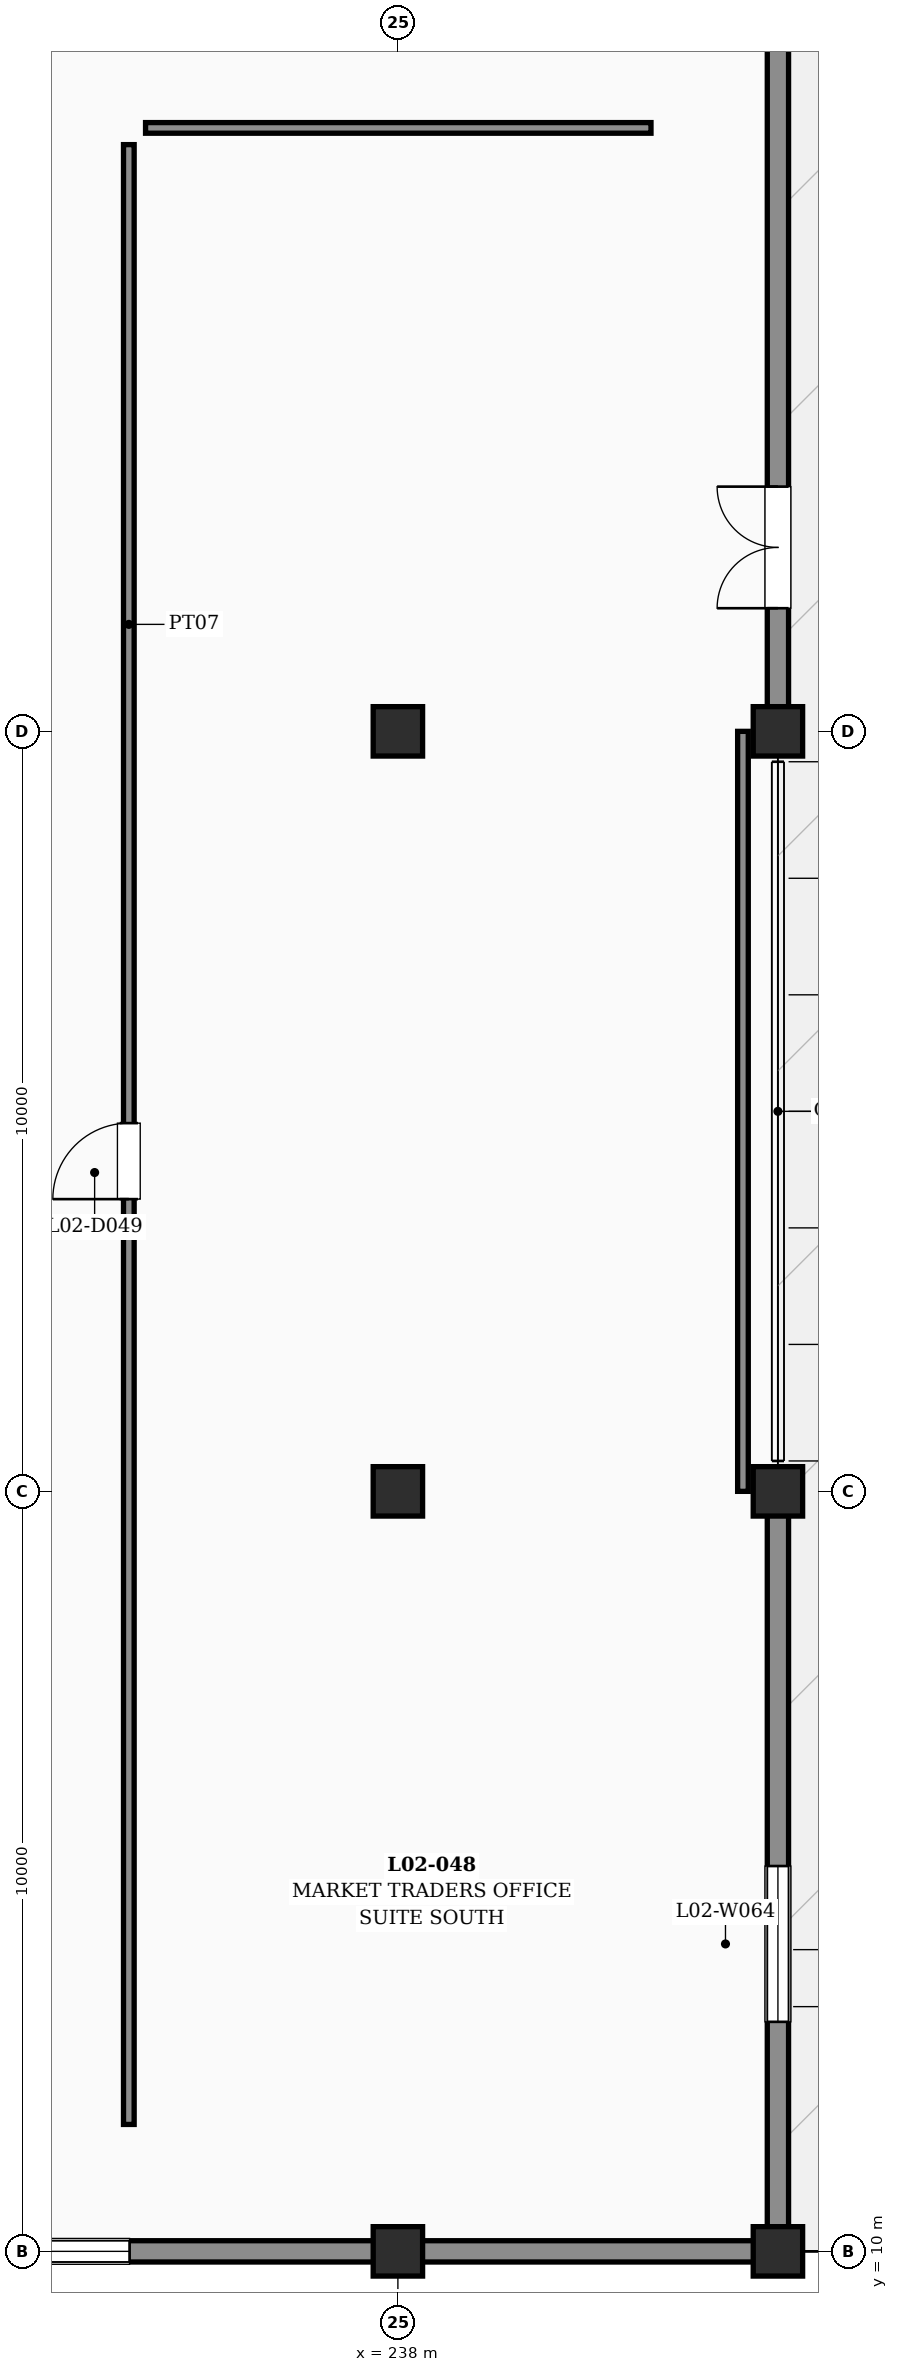
"""IFC4 building model, lengths in metres.
Left out: names, types, materials, properties, quantities, classifications, styles, units other than length and angle.
Written with IfcOpenShell. Run it as: python <this file> out.ifc"""

import sys

from ifc_helpers import new_model, si_unit, direction, frame, frame_2d, origin, origin_2d, place, context, subcontext, project, spatial, rectangle, extrude, element, fill, save


model = new_model("IFC4")
c1 = context("Model", 3, precision=1e-05, world=origin(), true_north=direction((0.0, 1.0)))
c2 = subcontext(c1, "Body", "Model", "MODEL_VIEW")
j1 = project(units=[si_unit("LENGTHUNIT", "METRE"), si_unit("PLANEANGLEUNIT", "RADIAN")], contexts=[c1])
p1 = place(None, origin())
s1 = spatial("IfcSite", under=j1, at=p1, CompositionType="ELEMENT")
p2 = place(p1, origin())
s2 = spatial("IfcBuilding", under=s1, at=p2, CompositionType="ELEMENT")
p3 = place(p2, frame((0.0, 0.0, 10.8)))
s3 = spatial("IfcBuildingStorey", under=s2, at=p3, CompositionType="ELEMENT", Elevation=10.8)
for number, where, z_axis, x_axis in (
    (1, (238.0, 10.0, 0.0), (0.0, 0.0, 1.0), (1.0, 0.0, 0.0)),
    (2, (238.0, 20.0, 0.0), (0.0, 0.0, 1.0), (1.0, 0.0, 0.0)),
    (3, (238.0, 30.0, 0.0), (0.0, 0.0, 1.0), (1.0, 0.0, 0.0)),
    (4, (243.0, 10.0, 0.0), (0.0, 0.0, 1.0), (1.0, 0.0, 0.0)),
    (5, (243.0, 20.0, 0.0), (0.0, 0.0, 1.0), (1.0, 0.0, 0.0)),
    (6, (243.0, 30.0, 0.0), (0.0, 0.0, 1.0), (1.0, 0.0, 0.0)),
):
    element("IfcColumn", number, at=place(p3, frame(where, z_axis=z_axis, x_axis=x_axis)), inside=s3, PredefinedType="COLUMN", context=c2, shape_type="SweptSolid", body=[
        extrude(rectangle(XDim=0.65, YDim=0.65, at=origin_2d()), origin(), (0.0, 0.0, 1.0), 4.2),
    ])
p4 = place(p3, frame((243.0, 10.22, 0.0), z_axis=(0.0, 0.0, 1.0), x_axis=(0.0, 1.0, 0.0)))
e7 = element("IfcWall", 7, at=p4, inside=s3, PredefinedType="SOLIDWALL", context=c2, shape_type="SweptSolid", body=[
    extrude(rectangle(XDim=9.56, YDim=0.28, at=frame_2d((4.78, 0.0))), origin(), (0.0, 0.0, 1.0), 3.16),
])
p5 = place(p4, frame((2.8, 0.0, 0.9)))
e8 = element("IfcOpeningElement", 8, at=p5, cuts=e7, PredefinedType="OPENING", context=c2, shape_type="SweptSolid", body=[
    extrude(rectangle(XDim=2.05, YDim=1.85, at=frame_2d((1.025, 0.925))), frame((0.0, 0.15, 0.0), z_axis=(0.0, -1.0, 0.0), x_axis=(1.0, 0.0, 0.0)), (0.0, 0.0, 1.0), 0.3),
])
p6 = place(p3, frame((243.0, 30.22, 0.0), z_axis=(0.0, 0.0, 1.0), x_axis=(0.0, 1.0, 0.0)))
e9 = element("IfcWall", 9, at=p6, inside=s3, PredefinedType="SOLIDWALL", context=c2, shape_type="SweptSolid", body=[
    extrude(rectangle(XDim=9.56, YDim=0.28, at=frame_2d((4.78, 0.0))), origin(), (0.0, 0.0, 1.0), 3.16),
])
p7 = place(p6, frame((1.4, 0.0, 0.0)))
e10 = element("IfcOpeningElement", 10, at=p7, cuts=e9, PredefinedType="OPENING", context=c2, shape_type="SweptSolid", body=[
    extrude(rectangle(XDim=1.6, YDim=2.3, at=frame_2d((0.8, 1.15))), frame((0.0, 0.15, 0.0), z_axis=(0.0, -1.0, 0.0), x_axis=(1.0, 0.0, 0.0)), (0.0, 0.0, 1.0), 0.3),
])
p8 = place(p3, frame((230.22, 10.0, 0.0), z_axis=(0.0, 0.0, 1.0), x_axis=(1.0, 0.0, 0.0)))
e11 = element("IfcWall", 11, at=p8, inside=s3, PredefinedType="SOLIDWALL", context=c2, shape_type="SweptSolid", body=[
    extrude(rectangle(XDim=7.56, YDim=0.28, at=frame_2d((3.78, 0.0))), origin(), (0.0, 0.0, 1.0), 3.11),
])
p9 = place(p8, frame((2.2, 0.0, 0.95)))
e12 = element("IfcOpeningElement", 12, at=p9, cuts=e11, PredefinedType="OPENING", context=c2, shape_type="SweptSolid", body=[
    extrude(rectangle(XDim=2.05, YDim=1.85, at=frame_2d((1.025, 0.925))), frame((0.0, 0.15, 0.0), z_axis=(0.0, -1.0, 0.0), x_axis=(1.0, 0.0, 0.0)), (0.0, 0.0, 1.0), 0.3),
])
p10 = place(p3, frame((238.22, 10.0, 0.0), z_axis=(0.0, 0.0, 1.0), x_axis=(1.0, 0.0, 0.0)))
e13 = element("IfcWall", 13, at=p10, inside=s3, PredefinedType="SOLIDWALL", context=c2, shape_type="SweptSolid", body=[
    extrude(rectangle(XDim=4.56, YDim=0.28, at=frame_2d((2.28, 0.0))), origin(), (0.0, 0.0, 1.0), 3.11),
])
p11 = place(p3, frame((234.46, 11.67, 0.0), z_axis=(0.0, 0.0, 1.0), x_axis=(0.0, 1.0, 0.0)))
e14 = element("IfcWall", 14, at=p11, inside=s3, PredefinedType="PARTITIONING", context=c2, shape_type="SweptSolid", body=[
    extrude(rectangle(XDim=26.05, YDim=0.14, at=frame_2d((13.025, 0.0))), origin(), (0.0, 0.0, 1.0), 3.86),
])
p12 = place(p11, frame((12.175, 0.0, 0.0)))
e15 = element("IfcOpeningElement", 15, at=p12, cuts=e14, PredefinedType="OPENING", context=c2, shape_type="SweptSolid", body=[
    extrude(rectangle(XDim=1.0, YDim=2.2, at=frame_2d((0.5, 1.1))), frame((0.0, 0.08, 0.0), z_axis=(0.0, -1.0, 0.0), x_axis=(1.0, 0.0, 0.0)), (0.0, 0.0, 1.0), 0.16),
])
p13 = place(p3, frame((234.68, 37.94, 0.0), z_axis=(0.0, 0.0, 1.0), x_axis=(1.0, 0.0, 0.0)))
e16 = element("IfcWall", 16, at=p13, inside=s3, PredefinedType="PARTITIONING", context=c2, shape_type="SweptSolid", body=[
    extrude(rectangle(XDim=6.65, YDim=0.14, at=frame_2d((3.325, 0.0))), origin(), (0.0, 0.0, 1.0), 3.86),
])
p14 = place(p3, frame((242.54, 30.0, 0.0), z_axis=(0.0, 0.0, 1.0), x_axis=(0.0, -1.0, 0.0)))
e17 = element("IfcWall", 17, at=p14, inside=s3, PredefinedType="PARTITIONING", context=c2, shape_type="SweptSolid", body=[
    extrude(rectangle(XDim=10.0, YDim=0.14, at=frame_2d((5.0, 0.0))), origin(), (0.0, 0.0, 1.0), 3.86),
])
p15 = place(p5, origin())
e18 = element("IfcWindow", 18, at=p15, inside=s3, PartitioningType="SINGLE_PANEL", PredefinedType="WINDOW", context=c2, shape_type="SweptSolid", body=[
    extrude(rectangle(XDim=2.05, YDim=1.85, at=frame_2d((1.025, 0.925))), frame((0.0, 0.03, 0.0), z_axis=(0.0, -1.0, 0.0), x_axis=(1.0, 0.0, 0.0)), (0.0, 0.0, 1.0), 0.06),
])
fill(e8, e18)
p16 = place(p7, origin())
e19 = element("IfcDoor", 19, at=p16, inside=s3, OperationType="DOUBLE_DOOR_SINGLE_SWING", PredefinedType="DOOR", context=c2, shape_type="SweptSolid", body=[
    extrude(rectangle(XDim=1.6, YDim=2.3, at=frame_2d((0.8, 1.15))), frame((0.0, 0.025, 0.0), z_axis=(0.0, -1.0, 0.0), x_axis=(1.0, 0.0, 0.0)), (0.0, 0.0, 1.0), 0.05),
])
fill(e10, e19)
p17 = place(p9, origin())
e20 = element("IfcWindow", 20, at=p17, inside=s3, PartitioningType="SINGLE_PANEL", PredefinedType="WINDOW", context=c2, shape_type="SweptSolid", body=[
    extrude(rectangle(XDim=2.05, YDim=1.85, at=frame_2d((1.025, 0.925))), frame((0.0, 0.03, 0.0), z_axis=(0.0, -1.0, 0.0), x_axis=(1.0, 0.0, 0.0)), (0.0, 0.0, 1.0), 0.06),
])
fill(e12, e20)
p18 = place(p12, origin())
e21 = element("IfcDoor", 21, at=p18, inside=s3, OperationType="SINGLE_SWING_LEFT", PredefinedType="DOOR", context=c2, shape_type="SweptSolid", body=[
    extrude(rectangle(XDim=1.0, YDim=2.2, at=frame_2d((0.5, 1.1))), frame((0.0, 0.025, 0.0), z_axis=(0.0, -1.0, 0.0), x_axis=(1.0, 0.0, 0.0)), (0.0, 0.0, 1.0), 0.05),
])
fill(e15, e21)
save(model, sys.argv[1])
